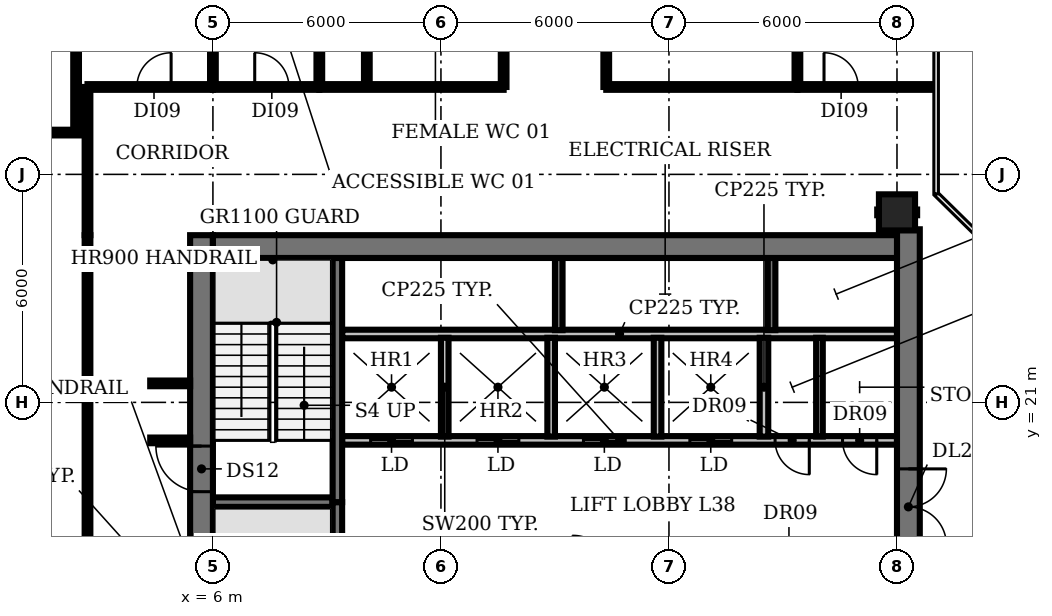
"""IFC4 building model, lengths in metres.
Left out: names, types, materials, properties, quantities, classifications, styles, units other than length and angle.
Written with IfcOpenShell. Run it as: python <this file> out.ifc"""

import sys

from ifc_helpers import new_model, si_unit, direction, frame, frame_2d, origin, origin_2d, place, context, subcontext, project, spatial, rectangle, circle, extrude, element, fill, save


model = new_model("IFC4")
c1 = context("Model", 3, precision=1e-05, world=origin(), true_north=direction((0.0, 1.0)))
c2 = subcontext(c1, "Body", "Model", "MODEL_VIEW")
j1 = project(units=[si_unit("LENGTHUNIT", "METRE"), si_unit("PLANEANGLEUNIT", "RADIAN")], contexts=[c1])
p1 = place(None, origin())
s1 = spatial("IfcSite", under=j1, at=p1, CompositionType="ELEMENT")
p2 = place(p1, origin())
s2 = spatial("IfcBuilding", under=s1, at=p2, CompositionType="ELEMENT")
p3 = place(p2, frame((0.0, 0.0, 171.8)))
s3 = spatial("IfcBuildingStorey", under=s2, at=p3, CompositionType="ELEMENT", Elevation=171.8)
p4 = place(p3, frame((24.0, 26.0, 0.0), z_axis=(0.0, 0.0, 1.0), x_axis=(1.0, 0.0, 0.0)))
e1 = element("IfcColumn", 1, at=p4, inside=s3, PredefinedType="COLUMN", context=c2, shape_type="SweptSolid", body=[
    extrude(circle(Radius=0.475, at=origin_2d()), origin(), (0.0, 0.0, 1.0), 3.85),
])
p5 = place(p3, frame((6.0, 18.375, 0.0), z_axis=(0.0, 0.0, 1.0), x_axis=(1.0, 0.0, 0.0)))
e2 = element("IfcWall", 2, at=p5, inside=s3, PredefinedType="SHEAR", context=c2, shape_type="SweptSolid", body=[
    extrude(rectangle(XDim=3.15, YDim=0.25, at=frame_2d((1.575, 0.0))), origin(), (0.0, 0.0, 1.0), 3.85),
])
p6 = place(p3, frame((24.0, 20.0, 0.0), z_axis=(0.0, 0.0, 1.0), x_axis=(-1.0, 0.0, 0.0)))
e3 = element("IfcWall", 3, at=p6, inside=s3, PredefinedType="PARTITIONING", context=c2, shape_type="SweptSolid", body=[
    extrude(rectangle(XDim=14.6, YDim=0.225, at=frame_2d((7.3, 0.0))), origin(), (0.0, 0.0, 1.0), 3.85),
])
p7 = place(p6, frame((12.75, 0.0, 0.0)))
e4 = element("IfcOpeningElement", 4, at=p7, cuts=e3, PredefinedType="OPENING", context=c2, shape_type="SweptSolid", body=[
    extrude(rectangle(XDim=1.1, YDim=2.1, at=frame_2d((0.55, 1.05))), frame((0.0, 0.123, 0.0), z_axis=(0.0, -1.0, 0.0), x_axis=(1.0, 0.0, 0.0)), (0.0, 0.0, 1.0), 0.245),
])
p8 = place(p6, frame((9.95, 0.0, 0.0)))
e5 = element("IfcOpeningElement", 5, at=p8, cuts=e3, PredefinedType="OPENING", context=c2, shape_type="SweptSolid", body=[
    extrude(rectangle(XDim=1.1, YDim=2.1, at=frame_2d((0.55, 1.05))), frame((0.0, 0.123, 0.0), z_axis=(0.0, -1.0, 0.0), x_axis=(1.0, 0.0, 0.0)), (0.0, 0.0, 1.0), 0.245),
])
p9 = place(p6, frame((7.15, 0.0, 0.0)))
e6 = element("IfcOpeningElement", 6, at=p9, cuts=e3, PredefinedType="OPENING", context=c2, shape_type="SweptSolid", body=[
    extrude(rectangle(XDim=1.1, YDim=2.1, at=frame_2d((0.55, 1.05))), frame((0.0, 0.123, 0.0), z_axis=(0.0, -1.0, 0.0), x_axis=(1.0, 0.0, 0.0)), (0.0, 0.0, 1.0), 0.245),
])
p10 = place(p6, frame((4.35, 0.0, 0.0)))
e7 = element("IfcOpeningElement", 7, at=p10, cuts=e3, PredefinedType="OPENING", context=c2, shape_type="SweptSolid", body=[
    extrude(rectangle(XDim=1.1, YDim=2.1, at=frame_2d((0.55, 1.05))), frame((0.0, 0.123, 0.0), z_axis=(0.0, -1.0, 0.0), x_axis=(1.0, 0.0, 0.0)), (0.0, 0.0, 1.0), 0.245),
])
p11 = place(p6, frame((2.308, 0.0, 0.0)))
e8 = element("IfcOpeningElement", 8, at=p11, cuts=e3, PredefinedType="OPENING", context=c2, shape_type="SweptSolid", body=[
    extrude(rectangle(XDim=0.9, YDim=2.1, at=frame_2d((0.45, 1.05))), frame((0.0, 0.123, 0.0), z_axis=(0.0, -1.0, 0.0), x_axis=(1.0, 0.0, 0.0)), (0.0, 0.0, 1.0), 0.245),
])
p12 = place(p6, frame((0.532, 0.0, 0.0)))
e9 = element("IfcOpeningElement", 9, at=p12, cuts=e3, PredefinedType="OPENING", context=c2, shape_type="SweptSolid", body=[
    extrude(rectangle(XDim=0.9, YDim=2.1, at=frame_2d((0.45, 1.05))), frame((0.0, 0.123, 0.0), z_axis=(0.0, -1.0, 0.0), x_axis=(1.0, 0.0, 0.0)), (0.0, 0.0, 1.0), 0.245),
])
p13 = place(p3, frame((9.4, 22.8, 0.0), z_axis=(0.0, 0.0, 1.0), x_axis=(1.0, 0.0, 0.0)))
e10 = element("IfcWall", 10, at=p13, inside=s3, PredefinedType="PARTITIONING", context=c2, shape_type="SweptSolid", body=[
    extrude(rectangle(XDim=14.6, YDim=0.225, at=frame_2d((7.3, 0.0))), origin(), (0.0, 0.0, 1.0), 3.85),
])
p14 = place(p3, frame((9.275, 18.375, 0.0), z_axis=(0.0, 0.0, 1.0), x_axis=(0.0, -1.0, 0.0)))
e11 = element("IfcWall", 11, at=p14, inside=s3, PredefinedType="SHEAR", context=c2, shape_type="SweptSolid", body=[
    extrude(rectangle(XDim=6.55, YDim=0.25, at=frame_2d((3.275, 0.0))), origin(), (0.0, 0.0, 1.0), 3.85),
])
p15 = place(p14, frame((5.075, 0.0, 0.0)))
e12 = element("IfcOpeningElement", 12, at=p15, cuts=e11, PredefinedType="OPENING", context=c2, shape_type="SweptSolid", body=[
    extrude(rectangle(XDim=1.0, YDim=2.1, at=frame_2d((0.5, 1.05))), frame((0.0, 0.135, 0.0), z_axis=(0.0, -1.0, 0.0), x_axis=(1.0, 0.0, 0.0)), (0.0, 0.0, 1.0), 0.27),
])
p16 = place(p3, frame((9.275, 18.375, 0.0), z_axis=(0.0, 0.0, 1.0), x_axis=(0.0, 1.0, 0.0)))
e13 = element("IfcWall", 13, at=p16, inside=s3, PredefinedType="SHEAR", context=c2, shape_type="SweptSolid", body=[
    extrude(rectangle(XDim=6.425, YDim=0.25, at=frame_2d((3.212, 0.0))), origin(), (0.0, 0.0, 1.0), 3.85),
])
for number, where, z_axis, x_axis in (
    (14, (12.1, 20.1, 0.0), (0.0, 0.0, 1.0), (0.0, 1.0, 0.0)),
    (15, (14.9, 20.1, 0.0), (0.0, 0.0, 1.0), (0.0, 1.0, 0.0)),
):
    element("IfcWall", number, at=place(p3, frame(where, z_axis=z_axis, x_axis=x_axis)), inside=s3, PredefinedType="SOLIDWALL", context=c2, shape_type="SweptSolid", body=[
        extrude(rectangle(XDim=2.6, YDim=0.2, at=frame_2d((1.3, 0.0))), origin(), (0.0, 0.0, 1.0), 3.85),
    ])
p17 = place(p3, frame((15.1, 22.9, 0.0), z_axis=(0.0, 0.0, 1.0), x_axis=(0.0, 1.0, 0.0)))
e16 = element("IfcWall", 16, at=p17, inside=s3, PredefinedType="SHEAR", context=c2, shape_type="SweptSolid", body=[
    extrude(rectangle(XDim=1.9, YDim=0.2, at=frame_2d((0.95, 0.0))), origin(), (0.0, 0.0, 1.0), 3.85),
])
p18 = place(p3, frame((17.7, 20.1, 0.0), z_axis=(0.0, 0.0, 1.0), x_axis=(0.0, 1.0, 0.0)))
e17 = element("IfcWall", 17, at=p18, inside=s3, PredefinedType="SOLIDWALL", context=c2, shape_type="SweptSolid", body=[
    extrude(rectangle(XDim=2.6, YDim=0.2, at=frame_2d((1.3, 0.0))), origin(), (0.0, 0.0, 1.0), 3.85),
])
p19 = place(p3, frame((20.5, 20.1, 0.0), z_axis=(0.0, 0.0, 1.0), x_axis=(0.0, 1.0, 0.0)))
e18 = element("IfcWall", 18, at=p19, inside=s3, PredefinedType="PARTITIONING", context=c2, shape_type="SweptSolid", body=[
    extrude(rectangle(XDim=2.6, YDim=0.225, at=frame_2d((1.3, 0.0))), origin(), (0.0, 0.0, 1.0), 3.85),
])
p20 = place(p3, frame((20.7, 22.9, 0.0), z_axis=(0.0, 0.0, 1.0), x_axis=(0.0, 1.0, 0.0)))
e19 = element("IfcWall", 19, at=p20, inside=s3, PredefinedType="SHEAR", context=c2, shape_type="SweptSolid", body=[
    extrude(rectangle(XDim=1.9, YDim=0.2, at=frame_2d((0.95, 0.0))), origin(), (0.0, 0.0, 1.0), 3.85),
])
p21 = place(p3, frame((21.96, 20.1, 0.0), z_axis=(0.0, 0.0, 1.0), x_axis=(0.0, 1.0, 0.0)))
e20 = element("IfcWall", 20, at=p21, inside=s3, PredefinedType="PARTITIONING", context=c2, shape_type="SweptSolid", body=[
    extrude(rectangle(XDim=2.6, YDim=0.175, at=frame_2d((1.3, 0.0))), origin(), (0.0, 0.0, 1.0), 3.85),
])
p22 = place(p3, frame((5.7, 4.8, 0.0), z_axis=(0.0, 0.0, 1.0), x_axis=(0.0, 1.0, 0.0)))
e21 = element("IfcWall", 21, at=p22, inside=s3, PredefinedType="SHEAR", context=c2, shape_type="SweptSolid", body=[
    extrude(rectangle(XDim=20.6, YDim=0.6, at=frame_2d((10.3, 0.0))), origin(), (0.0, 0.0, 1.0), 3.85),
])
p23 = place(p22, frame((0.85, 0.0, 0.0)))
e22 = element("IfcOpeningElement", 22, at=p23, cuts=e21, PredefinedType="OPENING", context=c2, shape_type="SweptSolid", body=[
    extrude(rectangle(XDim=1.5, YDim=2.1, at=frame_2d((0.75, 1.05))), frame((0.0, 0.31, 0.0), z_axis=(0.0, -1.0, 0.0), x_axis=(1.0, 0.0, 0.0)), (0.0, 0.0, 1.0), 0.62),
])
p24 = place(p22, frame((7.3, 0.0, 0.0)))
e23 = element("IfcOpeningElement", 23, at=p24, cuts=e21, PredefinedType="OPENING", context=c2, shape_type="SweptSolid", body=[
    extrude(rectangle(XDim=1.2, YDim=2.1, at=frame_2d((0.6, 1.05))), frame((0.0, 0.31, 0.0), z_axis=(0.0, -1.0, 0.0), x_axis=(1.0, 0.0, 0.0)), (0.0, 0.0, 1.0), 0.62),
])
p25 = place(p22, frame((13.85, 0.0, 0.0)))
e24 = element("IfcOpeningElement", 24, at=p25, cuts=e21, PredefinedType="OPENING", context=c2, shape_type="SweptSolid", body=[
    extrude(rectangle(XDim=1.2, YDim=2.1, at=frame_2d((0.6, 1.05))), frame((0.0, 0.31, 0.0), z_axis=(0.0, -1.0, 0.0), x_axis=(1.0, 0.0, 0.0)), (0.0, 0.0, 1.0), 0.62),
])
p26 = place(p3, frame((24.3, 25.555, 0.0), z_axis=(0.0, 0.0, 1.0), x_axis=(0.0, -1.0, 0.0)))
e25 = element("IfcWall", 25, at=p26, inside=s3, PredefinedType="SHEAR", context=c2, shape_type="SweptSolid", body=[
    extrude(rectangle(XDim=20.755, YDim=0.6, at=frame_2d((10.377, 0.0))), origin(), (0.0, 0.0, 1.0), 3.85),
])
p27 = place(p26, frame((18.405, 0.0, 0.0)))
e26 = element("IfcOpeningElement", 26, at=p27, cuts=e25, PredefinedType="OPENING", context=c2, shape_type="SweptSolid", body=[
    extrude(rectangle(XDim=1.5, YDim=2.1, at=frame_2d((0.75, 1.05))), frame((0.0, 0.31, 0.0), z_axis=(0.0, -1.0, 0.0), x_axis=(1.0, 0.0, 0.0)), (0.0, 0.0, 1.0), 0.62),
])
p28 = place(p26, frame((12.305, 0.0, 0.0)))
e27 = element("IfcOpeningElement", 27, at=p28, cuts=e25, PredefinedType="OPENING", context=c2, shape_type="SweptSolid", body=[
    extrude(rectangle(XDim=0.9, YDim=2.1, at=frame_2d((0.45, 1.05))), frame((0.0, 0.31, 0.0), z_axis=(0.0, -1.0, 0.0), x_axis=(1.0, 0.0, 0.0)), (0.0, 0.0, 1.0), 0.62),
])
p29 = place(p26, frame((6.305, 0.0, 0.0)))
e28 = element("IfcOpeningElement", 28, at=p29, cuts=e25, PredefinedType="OPENING", context=c2, shape_type="SweptSolid", body=[
    extrude(rectangle(XDim=2.0, YDim=2.1, at=frame_2d((1.0, 1.05))), frame((0.0, 0.31, 0.0), z_axis=(0.0, -1.0, 0.0), x_axis=(1.0, 0.0, 0.0)), (0.0, 0.0, 1.0), 0.62),
])
p30 = place(p3, frame((6.0, 25.1, 0.0), z_axis=(0.0, 0.0, 1.0), x_axis=(1.0, 0.0, 0.0)))
e29 = element("IfcWall", 29, at=p30, inside=s3, PredefinedType="SHEAR", context=c2, shape_type="SweptSolid", body=[
    extrude(rectangle(XDim=18.0, YDim=0.6, at=frame_2d((9.0, 0.0))), origin(), (0.0, 0.0, 1.0), 3.85),
])
p31 = place(p3, frame((-1.0, 28.1, 0.0), z_axis=(0.0, 0.0, 1.0), x_axis=(1.0, 0.0, 0.0)))
e30 = element("IfcWall", 30, at=p31, inside=s3, PredefinedType="PARTITIONING", context=c2, shape_type="SweptSolid", body=[
    extrude(rectangle(XDim=3.7, YDim=0.15, at=frame_2d((1.85, 0.0))), origin(), (0.0, 0.0, 1.0), 2.88),
])
p32 = place(p3, frame((2.4, 28.1, 0.0), z_axis=(0.0, 0.0, 1.0), x_axis=(0.0, 1.0, 0.0)))
e31 = element("IfcWall", 31, at=p32, inside=s3, PredefinedType="PARTITIONING", context=c2, shape_type="SweptSolid", body=[
    extrude(rectangle(XDim=6.0, YDim=0.15, at=frame_2d((3.0, 0.0))), origin(), (0.0, 0.0, 1.0), 2.88),
])
p33 = place(p3, frame((2.7, 4.8, 0.0), z_axis=(0.0, 0.0, 1.0), x_axis=(0.0, 1.0, 0.0)))
e32 = element("IfcWall", 32, at=p33, inside=s3, PredefinedType="PARTITIONING", context=c2, shape_type="SweptSolid", body=[
    extrude(rectangle(XDim=20.6, YDim=0.15, at=frame_2d((10.3, 0.0))), origin(), (0.0, 0.0, 1.0), 2.88),
])
p34 = place(p33, frame((10.2, 0.0, 0.0)))
e33 = element("IfcOpeningElement", 33, at=p34, cuts=e32, PredefinedType="OPENING", context=c2, shape_type="SweptSolid", body=[
    extrude(rectangle(XDim=1.2, YDim=2.1, at=frame_2d((0.6, 1.05))), frame((0.0, 0.085, 0.0), z_axis=(0.0, -1.0, 0.0), x_axis=(1.0, 0.0, 0.0)), (0.0, 0.0, 1.0), 0.17),
])
p35 = place(p3, frame((2.7, 25.4, 0.0), z_axis=(0.0, 0.0, 1.0), x_axis=(0.0, 1.0, 0.0)))
e34 = element("IfcWall", 34, at=p35, inside=s3, PredefinedType="PARTITIONING", context=c2, shape_type="SweptSolid", body=[
    extrude(rectangle(XDim=3.9, YDim=0.15, at=frame_2d((1.95, 0.0))), origin(), (0.0, 0.0, 1.0), 2.88),
])
p36 = place(p3, frame((2.7, 29.3, 0.0), z_axis=(0.0, 0.0, 1.0), x_axis=(1.0, 0.0, 0.0)))
e35 = element("IfcWall", 35, at=p36, inside=s3, PredefinedType="PARTITIONING", context=c2, shape_type="SweptSolid", body=[
    extrude(rectangle(XDim=3.3, YDim=0.15, at=frame_2d((1.65, 0.0))), origin(), (0.0, 0.0, 1.0), 2.88),
])
p37 = place(p36, frame((1.3, 0.0, 0.0)))
e36 = element("IfcOpeningElement", 36, at=p37, cuts=e35, PredefinedType="OPENING", context=c2, shape_type="SweptSolid", body=[
    extrude(rectangle(XDim=0.9, YDim=2.1, at=frame_2d((0.45, 1.05))), frame((0.0, 0.085, 0.0), z_axis=(0.0, -1.0, 0.0), x_axis=(1.0, 0.0, 0.0)), (0.0, 0.0, 1.0), 0.17),
])
for number, where, z_axis, x_axis in (
    (37, (4.35, 20.0, 0.0), (0.0, 0.0, 1.0), (1.0, 0.0, 0.0)),
    (38, (4.35, 21.5, 0.0), (0.0, 0.0, 1.0), (1.0, 0.0, 0.0)),
):
    element("IfcWall", number, at=place(p3, frame(where, z_axis=z_axis, x_axis=x_axis)), inside=s3, PredefinedType="PARTITIONING", context=c2, shape_type="SweptSolid", body=[
        extrude(rectangle(XDim=1.05, YDim=0.15, at=frame_2d((0.525, 0.0))), origin(), (0.0, 0.0, 1.0), 2.88),
    ])
p38 = place(p3, frame((6.0, 29.3, 0.0), z_axis=(0.0, 0.0, 1.0), x_axis=(0.0, 1.0, 0.0)))
e39 = element("IfcWall", 39, at=p38, inside=s3, PredefinedType="PARTITIONING", context=c2, shape_type="SweptSolid", body=[
    extrude(rectangle(XDim=4.8, YDim=0.15, at=frame_2d((2.4, 0.0))), origin(), (0.0, 0.0, 1.0), 2.88),
])
p39 = place(p3, frame((6.0, 29.3, 0.0), z_axis=(0.0, 0.0, 1.0), x_axis=(1.0, 0.0, 0.0)))
e40 = element("IfcWall", 40, at=p39, inside=s3, PredefinedType="PARTITIONING", context=c2, shape_type="SweptSolid", body=[
    extrude(rectangle(XDim=2.8, YDim=0.15, at=frame_2d((1.4, 0.0))), origin(), (0.0, 0.0, 1.0), 2.88),
])
p40 = place(p39, frame((1.1, 0.0, 0.0)))
e41 = element("IfcOpeningElement", 41, at=p40, cuts=e40, PredefinedType="OPENING", context=c2, shape_type="SweptSolid", body=[
    extrude(rectangle(XDim=0.9, YDim=2.1, at=frame_2d((0.45, 1.05))), frame((0.0, 0.085, 0.0), z_axis=(0.0, -1.0, 0.0), x_axis=(1.0, 0.0, 0.0)), (0.0, 0.0, 1.0), 0.17),
])
p41 = place(p3, frame((8.8, 29.3, 0.0), z_axis=(0.0, 0.0, 1.0), x_axis=(0.0, 1.0, 0.0)))
e42 = element("IfcWall", 42, at=p41, inside=s3, PredefinedType="PARTITIONING", context=c2, shape_type="SweptSolid", body=[
    extrude(rectangle(XDim=4.8, YDim=0.15, at=frame_2d((2.4, 0.0))), origin(), (0.0, 0.0, 1.0), 2.88),
])
p42 = place(p3, frame((8.8, 29.3, 0.0), z_axis=(0.0, 0.0, 1.0), x_axis=(1.0, 0.0, 0.0)))
e43 = element("IfcWall", 43, at=p42, inside=s3, PredefinedType="PARTITIONING", context=c2, shape_type="SweptSolid", body=[
    extrude(rectangle(XDim=4.85, YDim=0.15, at=frame_2d((2.425, 0.0))), origin(), (0.0, 0.0, 1.0), 2.88),
])
p43 = place(p3, frame((10.05, 29.3, 0.0), z_axis=(0.0, 0.0, 1.0), x_axis=(0.0, 1.0, 0.0)))
e44 = element("IfcWall", 44, at=p43, inside=s3, PredefinedType="PARTITIONING", context=c2, shape_type="SweptSolid", body=[
    extrude(rectangle(XDim=4.8, YDim=0.15, at=frame_2d((2.4, 0.0))), origin(), (0.0, 0.0, 1.0), 2.88),
])
p44 = place(p3, frame((13.65, 29.3, 0.0), z_axis=(0.0, 0.0, 1.0), x_axis=(0.0, 1.0, 0.0)))
e45 = element("IfcWall", 45, at=p44, inside=s3, PredefinedType="PARTITIONING", context=c2, shape_type="SweptSolid", body=[
    extrude(rectangle(XDim=4.8, YDim=0.15, at=frame_2d((2.4, 0.0))), origin(), (0.0, 0.0, 1.0), 2.88),
])
p45 = place(p44, frame((1.9, 0.0, 0.0)))
e46 = element("IfcOpeningElement", 46, at=p45, cuts=e45, PredefinedType="OPENING", context=c2, shape_type="SweptSolid", body=[
    extrude(rectangle(XDim=0.9, YDim=2.1, at=frame_2d((0.45, 1.05))), frame((0.0, 0.085, 0.0), z_axis=(0.0, -1.0, 0.0), x_axis=(1.0, 0.0, 0.0)), (0.0, 0.0, 1.0), 0.17),
])
p46 = place(p3, frame((16.35, 29.3, 0.0), z_axis=(0.0, 0.0, 1.0), x_axis=(0.0, 1.0, 0.0)))
e47 = element("IfcWall", 47, at=p46, inside=s3, PredefinedType="PARTITIONING", context=c2, shape_type="SweptSolid", body=[
    extrude(rectangle(XDim=4.8, YDim=0.15, at=frame_2d((2.4, 0.0))), origin(), (0.0, 0.0, 1.0), 2.88),
])
p47 = place(p3, frame((16.35, 29.3, 0.0), z_axis=(0.0, 0.0, 1.0), x_axis=(1.0, 0.0, 0.0)))
e48 = element("IfcWall", 48, at=p47, inside=s3, PredefinedType="PARTITIONING", context=c2, shape_type="SweptSolid", body=[
    extrude(rectangle(XDim=5.03, YDim=0.15, at=frame_2d((2.515, 0.0))), origin(), (0.0, 0.0, 1.0), 2.88),
])
p48 = place(p3, frame((21.38, 29.3, 0.0), z_axis=(0.0, 0.0, 1.0), x_axis=(0.0, 1.0, 0.0)))
e49 = element("IfcWall", 49, at=p48, inside=s3, PredefinedType="PARTITIONING", context=c2, shape_type="SweptSolid", body=[
    extrude(rectangle(XDim=4.8, YDim=0.15, at=frame_2d((2.4, 0.0))), origin(), (0.0, 0.0, 1.0), 2.88),
])
p49 = place(p3, frame((21.38, 29.3, 0.0), z_axis=(0.0, 0.0, 1.0), x_axis=(1.0, 0.0, 0.0)))
e50 = element("IfcWall", 50, at=p49, inside=s3, PredefinedType="PARTITIONING", context=c2, shape_type="SweptSolid", body=[
    extrude(rectangle(XDim=3.6, YDim=0.15, at=frame_2d((1.8, 0.0))), origin(), (0.0, 0.0, 1.0), 2.88),
])
p50 = place(p49, frame((0.7, 0.0, 0.0)))
e51 = element("IfcOpeningElement", 51, at=p50, cuts=e50, PredefinedType="OPENING", context=c2, shape_type="SweptSolid", body=[
    extrude(rectangle(XDim=0.9, YDim=2.1, at=frame_2d((0.45, 1.05))), frame((0.0, 0.085, 0.0), z_axis=(0.0, -1.0, 0.0), x_axis=(1.0, 0.0, 0.0)), (0.0, 0.0, 1.0), 0.17),
])
p51 = place(p3, frame((23.48, 26.0, 0.0), z_axis=(0.0, 0.0, 1.0), x_axis=(1.0, 0.0, 0.0)))
e52 = element("IfcWall", 52, at=p51, inside=s3, PredefinedType="PARTITIONING", context=c2, shape_type="SweptSolid", body=[
    extrude(rectangle(XDim=1.05, YDim=0.15, at=frame_2d((0.525, 0.0))), origin(), (0.0, 0.0, 1.0), 2.88),
])
p52 = place(p7, origin())
e53 = element("IfcDoor", 53, at=p52, inside=s3, OperationType="DOUBLE_DOOR_SLIDING", PredefinedType="DOOR", context=c2, shape_type="SweptSolid", body=[
    extrude(rectangle(XDim=1.1, YDim=2.1, at=frame_2d((0.55, 1.05))), frame((0.0, 0.025, 0.0), z_axis=(0.0, -1.0, 0.0), x_axis=(1.0, 0.0, 0.0)), (0.0, 0.0, 1.0), 0.05),
])
fill(e4, e53)
p53 = place(p8, origin())
e54 = element("IfcDoor", 54, at=p53, inside=s3, OperationType="DOUBLE_DOOR_SLIDING", PredefinedType="DOOR", context=c2, shape_type="SweptSolid", body=[
    extrude(rectangle(XDim=1.1, YDim=2.1, at=frame_2d((0.55, 1.05))), frame((0.0, 0.025, 0.0), z_axis=(0.0, -1.0, 0.0), x_axis=(1.0, 0.0, 0.0)), (0.0, 0.0, 1.0), 0.05),
])
fill(e5, e54)
p54 = place(p9, origin())
e55 = element("IfcDoor", 55, at=p54, inside=s3, OperationType="DOUBLE_DOOR_SLIDING", PredefinedType="DOOR", context=c2, shape_type="SweptSolid", body=[
    extrude(rectangle(XDim=1.1, YDim=2.1, at=frame_2d((0.55, 1.05))), frame((0.0, 0.025, 0.0), z_axis=(0.0, -1.0, 0.0), x_axis=(1.0, 0.0, 0.0)), (0.0, 0.0, 1.0), 0.05),
])
fill(e6, e55)
p55 = place(p10, origin())
e56 = element("IfcDoor", 56, at=p55, inside=s3, OperationType="DOUBLE_DOOR_SLIDING", PredefinedType="DOOR", context=c2, shape_type="SweptSolid", body=[
    extrude(rectangle(XDim=1.1, YDim=2.1, at=frame_2d((0.55, 1.05))), frame((0.0, 0.025, 0.0), z_axis=(0.0, -1.0, 0.0), x_axis=(1.0, 0.0, 0.0)), (0.0, 0.0, 1.0), 0.05),
])
fill(e7, e56)
p56 = place(p11, origin())
e57 = element("IfcDoor", 57, at=p56, inside=s3, OperationType="SINGLE_SWING_LEFT", PredefinedType="DOOR", context=c2, shape_type="SweptSolid", body=[
    extrude(rectangle(XDim=0.9, YDim=2.1, at=frame_2d((0.45, 1.05))), frame((0.0, 0.025, 0.0), z_axis=(0.0, -1.0, 0.0), x_axis=(1.0, 0.0, 0.0)), (0.0, 0.0, 1.0), 0.05),
])
fill(e8, e57)
p57 = place(p12, origin())
e58 = element("IfcDoor", 58, at=p57, inside=s3, OperationType="SINGLE_SWING_LEFT", PredefinedType="DOOR", context=c2, shape_type="SweptSolid", body=[
    extrude(rectangle(XDim=0.9, YDim=2.1, at=frame_2d((0.45, 1.05))), frame((0.0, 0.025, 0.0), z_axis=(0.0, -1.0, 0.0), x_axis=(1.0, 0.0, 0.0)), (0.0, 0.0, 1.0), 0.05),
])
fill(e9, e58)
p58 = place(p25, origin())
e59 = element("IfcDoor", 59, at=p58, inside=s3, OperationType="SINGLE_SWING_RIGHT", PredefinedType="DOOR", context=c2, shape_type="SweptSolid", body=[
    extrude(rectangle(XDim=1.2, YDim=2.1, at=frame_2d((0.6, 1.05))), frame((0.0, 0.025, 0.0), z_axis=(0.0, -1.0, 0.0), x_axis=(1.0, 0.0, 0.0)), (0.0, 0.0, 1.0), 0.05),
])
fill(e24, e59)
p59 = place(p29, origin())
e60 = element("IfcDoor", 60, at=p59, inside=s3, OperationType="DOUBLE_DOOR_SINGLE_SWING", PredefinedType="DOOR", context=c2, shape_type="SweptSolid", body=[
    extrude(rectangle(XDim=2.0, YDim=2.1, at=frame_2d((1.0, 1.05))), frame((0.0, 0.025, 0.0), z_axis=(0.0, -1.0, 0.0), x_axis=(1.0, 0.0, 0.0)), (0.0, 0.0, 1.0), 0.05),
])
fill(e28, e60)
p60 = place(p37, origin())
e61 = element("IfcDoor", 61, at=p60, inside=s3, OperationType="SINGLE_SWING_RIGHT", PredefinedType="DOOR", context=c2, shape_type="SweptSolid", body=[
    extrude(rectangle(XDim=0.9, YDim=2.1, at=frame_2d((0.45, 1.05))), frame((0.0, 0.025, 0.0), z_axis=(0.0, -1.0, 0.0), x_axis=(1.0, 0.0, 0.0)), (0.0, 0.0, 1.0), 0.05),
])
fill(e36, e61)
p61 = place(p40, origin())
e62 = element("IfcDoor", 62, at=p61, inside=s3, OperationType="SINGLE_SWING_LEFT", PredefinedType="DOOR", context=c2, shape_type="SweptSolid", body=[
    extrude(rectangle(XDim=0.9, YDim=2.1, at=frame_2d((0.45, 1.05))), frame((0.0, 0.025, 0.0), z_axis=(0.0, -1.0, 0.0), x_axis=(1.0, 0.0, 0.0)), (0.0, 0.0, 1.0), 0.05),
])
fill(e41, e62)
p62 = place(p50, origin())
e63 = element("IfcDoor", 63, at=p62, inside=s3, OperationType="SINGLE_SWING_LEFT", PredefinedType="DOOR", context=c2, shape_type="SweptSolid", body=[
    extrude(rectangle(XDim=0.9, YDim=2.1, at=frame_2d((0.45, 1.05))), frame((0.0, 0.025, 0.0), z_axis=(0.0, -1.0, 0.0), x_axis=(1.0, 0.0, 0.0)), (0.0, 0.0, 1.0), 0.05),
])
fill(e51, e63)
save(model, sys.argv[1])
